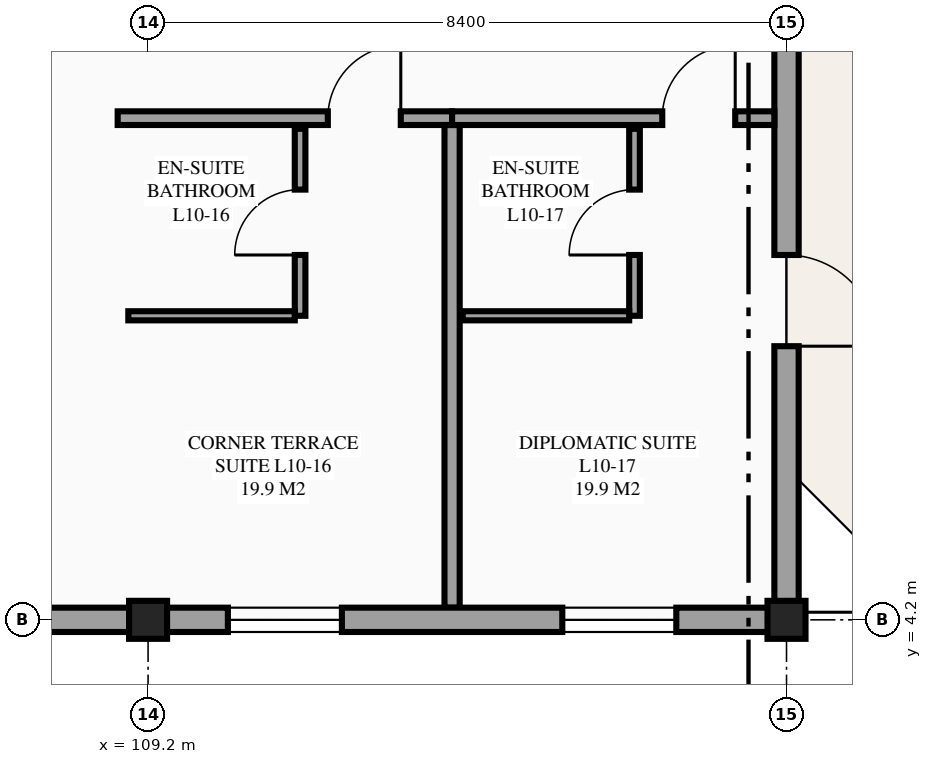
"""IFC4 building model, lengths in metres.
Left out: names, types, materials, properties, quantities, classifications, styles, units other than length and angle.
Written with IfcOpenShell. Run it as: python <this file> out.ifc"""

import sys

from ifc_helpers import new_model, si_unit, direction, frame, frame_2d, origin, origin_2d, place, context, subcontext, project, spatial, rectangle, extrude, element, fill, save


model = new_model("IFC4")
c1 = context("Model", 3, precision=1e-05, world=origin(), true_north=direction((0.0, 1.0)))
c2 = subcontext(c1, "Body", "Model", "MODEL_VIEW")
j1 = project(units=[si_unit("LENGTHUNIT", "METRE"), si_unit("PLANEANGLEUNIT", "RADIAN")], contexts=[c1])
p1 = place(None, origin())
s1 = spatial("IfcSite", under=j1, at=p1, CompositionType="ELEMENT")
p2 = place(p1, origin())
s2 = spatial("IfcBuilding", under=s1, at=p2, CompositionType="ELEMENT")
p3 = place(p2, frame((0.0, 0.0, 39.9)))
s3 = spatial("IfcBuildingStorey", under=s2, at=p3, CompositionType="ELEMENT", Elevation=39.9)
for number, where, z_axis, x_axis in (
    (1, (109.2, 4.2, 0.0), (0.0, 0.0, 1.0), (1.0, 0.0, 0.0)),
    (2, (117.6, 4.2, 0.0), (0.0, 0.0, 1.0), (1.0, 0.0, 0.0)),
):
    element("IfcColumn", number, at=place(p3, frame(where, z_axis=z_axis, x_axis=x_axis)), inside=s3, PredefinedType="COLUMN", context=c2, shape_type="SweptSolid", body=[
        extrude(rectangle(XDim=0.5, YDim=0.5, at=origin_2d()), origin(), (0.0, 0.0, 1.0), 3.6),
    ])
p4 = place(p3, frame((117.6, 4.2, 0.0), z_axis=(0.0, 0.0, 1.0), x_axis=(0.0, 1.0, 0.0)))
e3 = element("IfcWall", 3, at=p4, inside=s3, PredefinedType="STANDARD", context=c2, shape_type="SweptSolid", body=[
    extrude(rectangle(XDim=8.4, YDim=0.32, at=frame_2d((4.2, 0.0))), origin(), (0.0, 0.0, 1.0), 2.43),
])
p5 = place(p4, frame((4.8, 0.0, 0.0), z_axis=(0.0, 0.0, 1.0), x_axis=(-1.0, 0.0, 0.0)))
e4 = element("IfcOpeningElement", 4, at=p5, cuts=e3, PredefinedType="OPENING", context=c2, shape_type="SweptSolid", body=[
    extrude(rectangle(XDim=1.2, YDim=2.2, at=frame_2d((0.6, 1.1))), frame((0.0, 0.17, 0.0), z_axis=(0.0, -1.0, 0.0), x_axis=(1.0, 0.0, 0.0)), (0.0, 0.0, 1.0), 0.34),
])
p6 = place(p3, frame((108.8, 10.8, 0.0), z_axis=(0.0, 0.0, 1.0), x_axis=(1.0, 0.0, 0.0)))
e5 = element("IfcWall", 5, at=p6, inside=s3, PredefinedType="PARTITIONING", context=c2, shape_type="SweptSolid", body=[
    extrude(rectangle(XDim=4.4, YDim=0.18, at=frame_2d((2.2, 0.0))), origin(), (0.0, 0.0, 1.0), 3.375),
])
p7 = place(p6, frame((2.765, 0.0, 0.0)))
e6 = element("IfcOpeningElement", 6, at=p7, cuts=e5, PredefinedType="OPENING", context=c2, shape_type="SweptSolid", body=[
    extrude(rectangle(XDim=0.96, YDim=2.15, at=frame_2d((0.48, 1.075))), frame((0.0, 0.1, 0.0), z_axis=(0.0, -1.0, 0.0), x_axis=(1.0, 0.0, 0.0)), (0.0, 0.0, 1.0), 0.2),
])
p8 = place(p3, frame((113.2, 4.36, 0.0), z_axis=(0.0, 0.0, 1.0), x_axis=(0.0, 1.0, 0.0)))
e7 = element("IfcWall", 7, at=p8, inside=s3, PredefinedType="PARTITIONING", context=c2, shape_type="SweptSolid", body=[
    extrude(rectangle(XDim=6.35, YDim=0.2, at=frame_2d((3.175, 0.0))), origin(), (0.0, 0.0, 1.0), 3.375),
])
p9 = place(p3, frame((111.2, 8.2, 0.0), z_axis=(0.0, 0.0, 1.0), x_axis=(0.0, 1.0, 0.0)))
e8 = element("IfcWall", 8, at=p9, inside=s3, PredefinedType="PARTITIONING", context=c2, shape_type="SweptSolid", body=[
    extrude(rectangle(XDim=2.46, YDim=0.14, at=frame_2d((1.23, 0.0))), origin(), (0.0, 0.0, 1.0), 3.375),
])
p10 = place(p9, frame((0.8, 0.0, 0.0)))
e9 = element("IfcOpeningElement", 9, at=p10, cuts=e8, PredefinedType="OPENING", context=c2, shape_type="SweptSolid", body=[
    extrude(rectangle(XDim=0.86, YDim=2.1, at=frame_2d((0.43, 1.05))), frame((0.0, 0.08, 0.0), z_axis=(0.0, -1.0, 0.0), x_axis=(1.0, 0.0, 0.0)), (0.0, 0.0, 1.0), 0.16),
])
p11 = place(p3, frame((108.94, 8.2, 0.0), z_axis=(0.0, 0.0, 1.0), x_axis=(1.0, 0.0, 0.0)))
e10 = element("IfcWall", 10, at=p11, inside=s3, PredefinedType="PARTITIONING", context=c2, shape_type="SweptSolid", body=[
    extrude(rectangle(XDim=2.19, YDim=0.12, at=frame_2d((1.095, 0.0))), origin(), (0.0, 0.0, 1.0), 3.375),
])
p12 = place(p3, frame((113.2, 10.8, 0.0), z_axis=(0.0, 0.0, 1.0), x_axis=(1.0, 0.0, 0.0)))
e11 = element("IfcWall", 11, at=p12, inside=s3, PredefinedType="PARTITIONING", context=c2, shape_type="SweptSolid", body=[
    extrude(rectangle(XDim=4.24, YDim=0.18, at=frame_2d((2.12, 0.0))), origin(), (0.0, 0.0, 1.0), 3.375),
])
p13 = place(p12, frame((2.765, 0.0, 0.0)))
e12 = element("IfcOpeningElement", 12, at=p13, cuts=e11, PredefinedType="OPENING", context=c2, shape_type="SweptSolid", body=[
    extrude(rectangle(XDim=0.96, YDim=2.15, at=frame_2d((0.48, 1.075))), frame((0.0, 0.1, 0.0), z_axis=(0.0, -1.0, 0.0), x_axis=(1.0, 0.0, 0.0)), (0.0, 0.0, 1.0), 0.2),
])
p14 = place(p3, frame((115.6, 8.2, 0.0), z_axis=(0.0, 0.0, 1.0), x_axis=(0.0, 1.0, 0.0)))
e13 = element("IfcWall", 13, at=p14, inside=s3, PredefinedType="PARTITIONING", context=c2, shape_type="SweptSolid", body=[
    extrude(rectangle(XDim=2.46, YDim=0.14, at=frame_2d((1.23, 0.0))), origin(), (0.0, 0.0, 1.0), 3.375),
])
p15 = place(p14, frame((0.8, 0.0, 0.0)))
e14 = element("IfcOpeningElement", 14, at=p15, cuts=e13, PredefinedType="OPENING", context=c2, shape_type="SweptSolid", body=[
    extrude(rectangle(XDim=0.86, YDim=2.1, at=frame_2d((0.43, 1.05))), frame((0.0, 0.08, 0.0), z_axis=(0.0, -1.0, 0.0), x_axis=(1.0, 0.0, 0.0)), (0.0, 0.0, 1.0), 0.16),
])
p16 = place(p3, frame((113.34, 8.2, 0.0), z_axis=(0.0, 0.0, 1.0), x_axis=(1.0, 0.0, 0.0)))
e15 = element("IfcWall", 15, at=p16, inside=s3, PredefinedType="PARTITIONING", context=c2, shape_type="SweptSolid", body=[
    extrude(rectangle(XDim=2.19, YDim=0.12, at=frame_2d((1.095, 0.0))), origin(), (0.0, 0.0, 1.0), 3.375),
])
p17 = place(p3, frame((100.8, 4.2, 0.0), z_axis=(0.0, 0.0, 1.0), x_axis=(1.0, 0.0, 0.0)))
e16 = element("IfcWall", 16, at=p17, inside=s3, PredefinedType="STANDARD", context=c2, shape_type="SweptSolid", body=[
    extrude(rectangle(XDim=16.8, YDim=0.32, at=frame_2d((8.4, 0.0))), origin(), (0.0, 0.0, 1.0), 2.63),
])
p18 = place(p17, frame((9.45, 0.0, 0.85)))
e17 = element("IfcOpeningElement", 17, at=p18, cuts=e16, PredefinedType="OPENING", context=c2, shape_type="SweptSolid", body=[
    extrude(rectangle(XDim=1.5, YDim=1.5, at=frame_2d((0.75, 0.75))), frame((0.0, 0.17, 0.0), z_axis=(0.0, -1.0, 0.0), x_axis=(1.0, 0.0, 0.0)), (0.0, 0.0, 1.0), 0.34),
])
p19 = place(p17, frame((13.85, 0.0, 0.85)))
e18 = element("IfcOpeningElement", 18, at=p19, cuts=e16, PredefinedType="OPENING", context=c2, shape_type="SweptSolid", body=[
    extrude(rectangle(XDim=1.5, YDim=1.5, at=frame_2d((0.75, 0.75))), frame((0.0, 0.17, 0.0), z_axis=(0.0, -1.0, 0.0), x_axis=(1.0, 0.0, 0.0)), (0.0, 0.0, 1.0), 0.34),
])
p20 = place(p18, origin())
e19 = element("IfcWindow", 19, at=p20, inside=s3, PartitioningType="SINGLE_PANEL", PredefinedType="WINDOW", context=c2, shape_type="SweptSolid", body=[
    extrude(rectangle(XDim=1.5, YDim=1.5, at=frame_2d((0.75, 0.75))), frame((0.0, 0.03, 0.0), z_axis=(0.0, -1.0, 0.0), x_axis=(1.0, 0.0, 0.0)), (0.0, 0.0, 1.0), 0.06),
])
fill(e17, e19)
p21 = place(p19, origin())
e20 = element("IfcWindow", 20, at=p21, inside=s3, PartitioningType="SINGLE_PANEL", PredefinedType="WINDOW", context=c2, shape_type="SweptSolid", body=[
    extrude(rectangle(XDim=1.5, YDim=1.5, at=frame_2d((0.75, 0.75))), frame((0.0, 0.03, 0.0), z_axis=(0.0, -1.0, 0.0), x_axis=(1.0, 0.0, 0.0)), (0.0, 0.0, 1.0), 0.06),
])
fill(e18, e20)
p22 = place(p5, origin())
e21 = element("IfcDoor", 21, at=p22, inside=s3, OperationType="SINGLE_SWING_LEFT", PredefinedType="DOOR", context=c2, shape_type="SweptSolid", body=[
    extrude(rectangle(XDim=1.2, YDim=2.2, at=frame_2d((0.6, 1.1))), frame((0.0, 0.025, 0.0), z_axis=(0.0, -1.0, 0.0), x_axis=(1.0, 0.0, 0.0)), (0.0, 0.0, 1.0), 0.05),
])
fill(e4, e21)
p23 = place(p7, origin())
e22 = element("IfcDoor", 22, at=p23, inside=s3, OperationType="SINGLE_SWING_RIGHT", PredefinedType="DOOR", context=c2, shape_type="SweptSolid", body=[
    extrude(rectangle(XDim=0.96, YDim=2.15, at=frame_2d((0.48, 1.075))), frame((0.0, 0.025, 0.0), z_axis=(0.0, -1.0, 0.0), x_axis=(1.0, 0.0, 0.0)), (0.0, 0.0, 1.0), 0.05),
])
fill(e6, e22)
p24 = place(p10, origin())
e23 = element("IfcDoor", 23, at=p24, inside=s3, OperationType="SINGLE_SWING_LEFT", PredefinedType="DOOR", context=c2, shape_type="SweptSolid", body=[
    extrude(rectangle(XDim=0.86, YDim=2.1, at=frame_2d((0.43, 1.05))), frame((0.0, 0.025, 0.0), z_axis=(0.0, -1.0, 0.0), x_axis=(1.0, 0.0, 0.0)), (0.0, 0.0, 1.0), 0.05),
])
fill(e9, e23)
p25 = place(p13, origin())
e24 = element("IfcDoor", 24, at=p25, inside=s3, OperationType="SINGLE_SWING_RIGHT", PredefinedType="DOOR", context=c2, shape_type="SweptSolid", body=[
    extrude(rectangle(XDim=0.96, YDim=2.15, at=frame_2d((0.48, 1.075))), frame((0.0, 0.025, 0.0), z_axis=(0.0, -1.0, 0.0), x_axis=(1.0, 0.0, 0.0)), (0.0, 0.0, 1.0), 0.05),
])
fill(e12, e24)
p26 = place(p15, origin())
e25 = element("IfcDoor", 25, at=p26, inside=s3, OperationType="SINGLE_SWING_LEFT", PredefinedType="DOOR", context=c2, shape_type="SweptSolid", body=[
    extrude(rectangle(XDim=0.86, YDim=2.1, at=frame_2d((0.43, 1.05))), frame((0.0, 0.025, 0.0), z_axis=(0.0, -1.0, 0.0), x_axis=(1.0, 0.0, 0.0)), (0.0, 0.0, 1.0), 0.05),
])
fill(e14, e25)
save(model, sys.argv[1])
